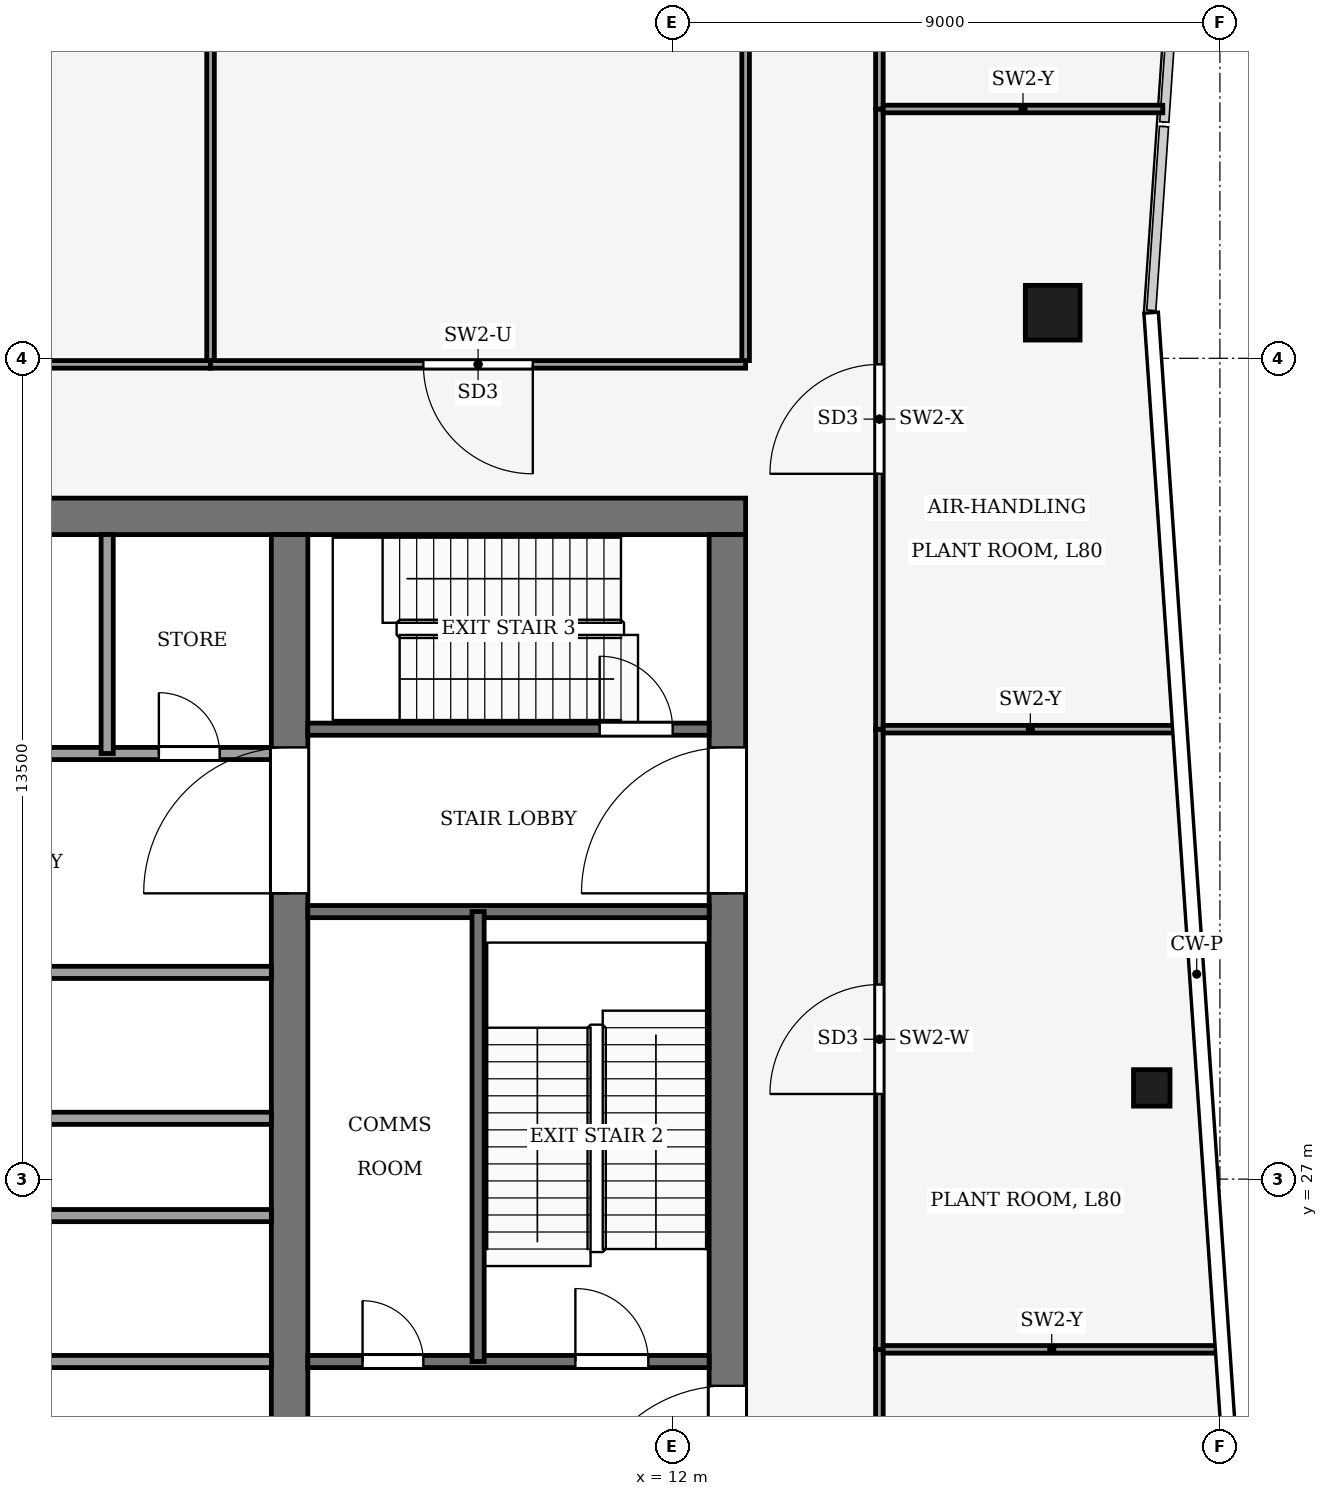
"""IFC4 building model, lengths in metres.
Left out: names, types, materials, properties, quantities, classifications, styles, units other than length and angle.
Written with IfcOpenShell. Run it as: python <this file> out.ifc"""

import sys

from ifc_helpers import new_model, si_unit, direction, frame, frame_2d, origin, origin_2d, place, context, subcontext, project, spatial, rectangle, hollow_rectangle, extrude, element, fill, save


model = new_model("IFC4")
c1 = context("Model", 3, precision=1e-05, world=origin(), true_north=direction((0.0, 1.0)))
c2 = subcontext(c1, "Body", "Model", "MODEL_VIEW")
j1 = project(units=[si_unit("LENGTHUNIT", "METRE"), si_unit("PLANEANGLEUNIT", "RADIAN")], contexts=[c1])
p1 = place(None, origin())
s1 = spatial("IfcSite", under=j1, at=p1, CompositionType="ELEMENT")
p2 = place(p1, origin())
s2 = spatial("IfcBuilding", under=s1, at=p2, CompositionType="ELEMENT")
p3 = place(p2, frame((0.0, 0.0, 354.5)))
s3 = spatial("IfcBuildingStorey", under=s2, at=p3, CompositionType="ELEMENT", Elevation=354.5)
p4 = place(p3, frame((-13.2, 37.9, -0.15), z_axis=(0.0, 0.0, 1.0), x_axis=(1.0, 0.0, 0.0)))
e1 = element("IfcWall", 1, at=p4, inside=s3, PredefinedType="SHEAR", context=c2, shape_type="SweptSolid", body=[
    extrude(rectangle(XDim=26.4, YDim=0.6, at=frame_2d((13.2, 0.0))), origin(), (0.0, 0.0, 1.0), 5.0),
])
p5 = place(p3, frame((12.9, 18.4, -0.15), z_axis=(0.0, 0.0, 1.0), x_axis=(0.0, 1.0, 0.0)))
e2 = element("IfcWall", 2, at=p5, inside=s3, PredefinedType="SHEAR", context=c2, shape_type="SweptSolid", body=[
    extrude(rectangle(XDim=19.2, YDim=0.6, at=frame_2d((9.6, 0.0))), origin(), (0.0, 0.0, 1.0), 5.0),
])
p6 = place(p5, frame((2.8, 0.0, 0.15)))
e3 = element("IfcOpeningElement", 3, at=p6, cuts=e2, PredefinedType="OPENING", context=c2, shape_type="SweptSolid", body=[
    extrude(rectangle(XDim=2.4, YDim=2.4, at=frame_2d((1.2, 1.2))), frame((0.0, 0.31, 0.0), z_axis=(0.0, -1.0, 0.0), x_axis=(1.0, 0.0, 0.0)), (0.0, 0.0, 1.0), 0.62),
])
p7 = place(p5, frame((13.3, 0.0, 0.15)))
e4 = element("IfcOpeningElement", 4, at=p7, cuts=e2, PredefinedType="OPENING", context=c2, shape_type="SweptSolid", body=[
    extrude(rectangle(XDim=2.4, YDim=2.4, at=frame_2d((1.2, 1.2))), frame((0.0, 0.31, 0.0), z_axis=(0.0, -1.0, 0.0), x_axis=(1.0, 0.0, 0.0)), (0.0, 0.0, 1.0), 0.62),
])
p8 = place(p3, frame((5.7, 18.4, -0.15), z_axis=(0.0, 0.0, 1.0), x_axis=(0.0, 1.0, 0.0)))
e5 = element("IfcWall", 5, at=p8, inside=s3, PredefinedType="SHEAR", context=c2, shape_type="SweptSolid", body=[
    extrude(rectangle(XDim=19.2, YDim=0.6, at=frame_2d((9.6, 0.0))), origin(), (0.0, 0.0, 1.0), 5.0),
])
p9 = place(p8, frame((13.3, 0.0, 0.15)))
e6 = element("IfcOpeningElement", 6, at=p9, cuts=e5, PredefinedType="OPENING", context=c2, shape_type="SweptSolid", body=[
    extrude(rectangle(XDim=2.4, YDim=2.4, at=frame_2d((1.2, 1.2))), frame((0.0, 0.31, 0.0), z_axis=(0.0, -1.0, 0.0), x_axis=(1.0, 0.0, 0.0)), (0.0, 0.0, 1.0), 0.62),
])
p10 = place(p3, frame((18.25, 41.25, 0.0), z_axis=(0.0, 0.0, 1.0), x_axis=(1.0, 0.0, 0.0)))
e7 = element("IfcColumn", 7, at=p10, inside=s3, PredefinedType="COLUMN", context=c2, shape_type="SweptSolid", body=[
    extrude(hollow_rectangle(XDim=0.9, YDim=0.9, WallThickness=0.04, at=origin_2d()), origin(), (0.0, 0.0, 1.0), 5.0),
])
p11 = place(p3, frame((19.879, 28.5, 0.0), z_axis=(0.0, 0.0, 1.0), x_axis=(1.0, 0.0, 0.0)))
e8 = element("IfcColumn", 8, at=p11, inside=s3, PredefinedType="COLUMN", context=c2, shape_type="SweptSolid", body=[
    extrude(hollow_rectangle(XDim=0.6, YDim=0.6, WallThickness=0.025, at=origin_2d()), origin(), (0.0, 0.0, 1.0), 5.0),
])
p12 = place(p3, frame((-5.4, 24.0, 0.0), z_axis=(0.0, 0.0, 1.0), x_axis=(1.0, 0.0, 0.0)))
e9 = element("IfcWall", 9, at=p12, inside=s3, PredefinedType="PARTITIONING", context=c2, shape_type="SweptSolid", body=[
    extrude(rectangle(XDim=10.8, YDim=0.2, at=frame_2d((5.4, 0.0))), origin(), (0.0, 0.0, 1.0), 4.85),
])
p13 = place(p12, frame((4.9, 0.0, 0.0)))
e10 = element("IfcOpeningElement", 10, at=p13, cuts=e9, PredefinedType="OPENING", context=c2, shape_type="SweptSolid", body=[
    extrude(rectangle(XDim=1.0, YDim=2.1, at=frame_2d((0.5, 1.05))), frame((0.0, 0.11, 0.0), z_axis=(0.0, -1.0, 0.0), x_axis=(1.0, 0.0, 0.0)), (0.0, 0.0, 1.0), 0.22),
])
p14 = place(p3, frame((6.0, 24.0, 0.0), z_axis=(0.0, 0.0, 1.0), x_axis=(1.0, 0.0, 0.0)))
e11 = element("IfcWall", 11, at=p14, inside=s3, PredefinedType="PARTITIONING", context=c2, shape_type="SweptSolid", body=[
    extrude(rectangle(XDim=6.6, YDim=0.2, at=frame_2d((3.3, 0.0))), origin(), (0.0, 0.0, 1.0), 4.85),
])
p15 = place(p14, frame((0.9, 0.0, 0.0)))
e12 = element("IfcOpeningElement", 12, at=p15, cuts=e11, PredefinedType="OPENING", context=c2, shape_type="SweptSolid", body=[
    extrude(rectangle(XDim=1.0, YDim=2.1, at=frame_2d((0.5, 1.05))), frame((0.0, 0.11, 0.0), z_axis=(0.0, -1.0, 0.0), x_axis=(1.0, 0.0, 0.0)), (0.0, 0.0, 1.0), 0.22),
])
p16 = place(p14, frame((4.4, 0.0, 0.0)))
e13 = element("IfcOpeningElement", 13, at=p16, cuts=e11, PredefinedType="OPENING", context=c2, shape_type="SweptSolid", body=[
    extrude(rectangle(XDim=1.2, YDim=2.2, at=frame_2d((0.6, 1.1))), frame((0.0, 0.11, 0.0), z_axis=(0.0, -1.0, 0.0), x_axis=(1.0, 0.0, 0.0)), (0.0, 0.0, 1.0), 0.22),
])
for number, where, z_axis, x_axis in (
    (14, (-5.4, 26.4, 0.0), (0.0, 0.0, 1.0), (1.0, 0.0, 0.0)),
    (15, (-5.4, 28.0, 0.0), (0.0, 0.0, 1.0), (1.0, 0.0, 0.0)),
):
    element("IfcWall", number, at=place(p3, frame(where, z_axis=z_axis, x_axis=x_axis)), inside=s3, PredefinedType="PARTITIONING", context=c2, shape_type="SweptSolid", body=[
        extrude(rectangle(XDim=10.8, YDim=0.2, at=frame_2d((5.4, 0.0))), origin(), (0.0, 0.0, 1.0), 4.85),
    ])
p17 = place(p3, frame((-5.4, 30.4, 0.0), z_axis=(0.0, 0.0, 1.0), x_axis=(1.0, 0.0, 0.0)))
e16 = element("IfcWall", 16, at=p17, inside=s3, PredefinedType="PARTITIONING", context=c2, shape_type="SweptSolid", body=[
    extrude(rectangle(XDim=10.8, YDim=0.2, at=frame_2d((5.4, 0.0))), origin(), (0.0, 0.0, 1.0), 4.85),
])
p18 = place(p17, frame((4.9, 0.0, 0.0)))
e17 = element("IfcOpeningElement", 17, at=p18, cuts=e16, PredefinedType="OPENING", context=c2, shape_type="SweptSolid", body=[
    extrude(rectangle(XDim=1.0, YDim=2.1, at=frame_2d((0.5, 1.05))), frame((0.0, 0.11, 0.0), z_axis=(0.0, -1.0, 0.0), x_axis=(1.0, 0.0, 0.0)), (0.0, 0.0, 1.0), 0.22),
])
p19 = place(p3, frame((6.0, 31.4, 0.0), z_axis=(0.0, 0.0, 1.0), x_axis=(1.0, 0.0, 0.0)))
e18 = element("IfcWall", 18, at=p19, inside=s3, PredefinedType="PARTITIONING", context=c2, shape_type="SweptSolid", body=[
    extrude(rectangle(XDim=6.6, YDim=0.2, at=frame_2d((3.3, 0.0))), origin(), (0.0, 0.0, 1.0), 4.85),
])
p20 = place(p3, frame((-5.4, 34.0, 0.0), z_axis=(0.0, 0.0, 1.0), x_axis=(1.0, 0.0, 0.0)))
e19 = element("IfcWall", 19, at=p20, inside=s3, PredefinedType="PARTITIONING", context=c2, shape_type="SweptSolid", body=[
    extrude(rectangle(XDim=10.8, YDim=0.2, at=frame_2d((5.4, 0.0))), origin(), (0.0, 0.0, 1.0), 4.85),
])
p21 = place(p20, frame((3.55, 0.0, 0.0)))
e20 = element("IfcOpeningElement", 20, at=p21, cuts=e19, PredefinedType="OPENING", context=c2, shape_type="SweptSolid", body=[
    extrude(rectangle(XDim=1.0, YDim=2.1, at=frame_2d((0.5, 1.05))), frame((0.0, 0.11, 0.0), z_axis=(0.0, -1.0, 0.0), x_axis=(1.0, 0.0, 0.0)), (0.0, 0.0, 1.0), 0.22),
])
p22 = place(p20, frame((8.95, 0.0, 0.0)))
e21 = element("IfcOpeningElement", 21, at=p22, cuts=e19, PredefinedType="OPENING", context=c2, shape_type="SweptSolid", body=[
    extrude(rectangle(XDim=1.0, YDim=2.1, at=frame_2d((0.5, 1.05))), frame((0.0, 0.11, 0.0), z_axis=(0.0, -1.0, 0.0), x_axis=(1.0, 0.0, 0.0)), (0.0, 0.0, 1.0), 0.22),
])
p23 = place(p3, frame((6.0, 34.4, 0.0), z_axis=(0.0, 0.0, 1.0), x_axis=(1.0, 0.0, 0.0)))
e22 = element("IfcWall", 22, at=p23, inside=s3, PredefinedType="PARTITIONING", context=c2, shape_type="SweptSolid", body=[
    extrude(rectangle(XDim=6.6, YDim=0.2, at=frame_2d((3.3, 0.0))), origin(), (0.0, 0.0, 1.0), 4.85),
])
p24 = place(p23, frame((4.8, 0.0, 0.0)))
e23 = element("IfcOpeningElement", 23, at=p24, cuts=e22, PredefinedType="OPENING", context=c2, shape_type="SweptSolid", body=[
    extrude(rectangle(XDim=1.2, YDim=2.2, at=frame_2d((0.6, 1.1))), frame((0.0, 0.11, 0.0), z_axis=(0.0, -1.0, 0.0), x_axis=(1.0, 0.0, 0.0)), (0.0, 0.0, 1.0), 0.22),
])
p25 = place(p3, frame((2.7, 34.0, 0.0), z_axis=(0.0, 0.0, 1.0), x_axis=(0.0, 1.0, 0.0)))
e24 = element("IfcWall", 24, at=p25, inside=s3, PredefinedType="PARTITIONING", context=c2, shape_type="SweptSolid", body=[
    extrude(rectangle(XDim=3.6, YDim=0.2, at=frame_2d((1.8, 0.0))), origin(), (0.0, 0.0, 1.0), 4.85),
])
p26 = place(p3, frame((8.8, 24.0, 0.0), z_axis=(0.0, 0.0, 1.0), x_axis=(0.0, 1.0, 0.0)))
e25 = element("IfcWall", 25, at=p26, inside=s3, PredefinedType="PARTITIONING", context=c2, shape_type="SweptSolid", body=[
    extrude(rectangle(XDim=7.4, YDim=0.2, at=frame_2d((3.7, 0.0))), origin(), (0.0, 0.0, 1.0), 4.85),
])
p27 = place(p3, frame((4.4, 40.4, 0.0), z_axis=(0.0, 0.0, 1.0), x_axis=(-1.0, 0.0, 0.0)))
e26 = element("IfcWall", 26, at=p27, inside=s3, PredefinedType="PARTITIONING", context=c2, shape_type="SweptSolid", body=[
    extrude(rectangle(XDim=8.8, YDim=0.125, at=frame_2d((4.4, 0.0))), origin(), (0.0, 0.0, 1.0), 4.37),
])
p28 = place(p27, frame((3.5, 0.0, 0.0)))
e27 = element("IfcOpeningElement", 27, at=p28, cuts=e26, PredefinedType="OPENING", context=c2, shape_type="SweptSolid", body=[
    extrude(rectangle(XDim=1.8, YDim=2.4, at=frame_2d((0.9, 1.2))), frame((0.0, 0.073, 0.0), z_axis=(0.0, -1.0, 0.0), x_axis=(1.0, 0.0, 0.0)), (0.0, 0.0, 1.0), 0.145),
])
p29 = place(p3, frame((13.2, 40.4, 0.0), z_axis=(0.0, 0.0, 1.0), x_axis=(-1.0, 0.0, 0.0)))
e28 = element("IfcWall", 28, at=p29, inside=s3, PredefinedType="PARTITIONING", context=c2, shape_type="SweptSolid", body=[
    extrude(rectangle(XDim=8.8, YDim=0.125, at=frame_2d((4.4, 0.0))), origin(), (0.0, 0.0, 1.0), 4.37),
])
p30 = place(p29, frame((3.5, 0.0, 0.0)))
e29 = element("IfcOpeningElement", 29, at=p30, cuts=e28, PredefinedType="OPENING", context=c2, shape_type="SweptSolid", body=[
    extrude(rectangle(XDim=1.8, YDim=2.4, at=frame_2d((0.9, 1.2))), frame((0.0, 0.073, 0.0), z_axis=(0.0, -1.0, 0.0), x_axis=(1.0, 0.0, 0.0)), (0.0, 0.0, 1.0), 0.145),
])
p31 = place(p3, frame((13.2, 40.462, 0.0), z_axis=(0.0, 0.0, 1.0), x_axis=(0.0, 1.0, 0.0)))
e30 = element("IfcWall", 30, at=p31, inside=s3, PredefinedType="PARTITIONING", context=c2, shape_type="SweptSolid", body=[
    extrude(rectangle(XDim=14.338, YDim=0.125, at=frame_2d((7.169, 0.0))), origin(), (0.0, 0.0, 1.0), 4.33),
])
p32 = place(p3, frame((15.4, 13.45, 0.0), z_axis=(0.0, 0.0, 1.0), x_axis=(0.0, 1.0, 0.0)))
e31 = element("IfcWall", 31, at=p32, inside=s3, PredefinedType="PARTITIONING", context=c2, shape_type="SweptSolid", body=[
    extrude(rectangle(XDim=10.75, YDim=0.125, at=frame_2d((5.375, 0.0))), origin(), (0.0, 0.0, 1.0), 3.812),
])
p33 = place(p32, frame((5.145, 0.0, 0.0)))
e32 = element("IfcOpeningElement", 32, at=p33, cuts=e31, PredefinedType="OPENING", context=c2, shape_type="SweptSolid", body=[
    extrude(rectangle(XDim=1.0, YDim=2.1, at=frame_2d((0.5, 1.05))), frame((0.0, 0.073, 0.0), z_axis=(0.0, -1.0, 0.0), x_axis=(1.0, 0.0, 0.0)), (0.0, 0.0, 1.0), 0.145),
])
p34 = place(p3, frame((15.4, 24.2, 0.0), z_axis=(0.0, 0.0, 1.0), x_axis=(0.0, 1.0, 0.0)))
e33 = element("IfcWall", 33, at=p34, inside=s3, PredefinedType="PARTITIONING", context=c2, shape_type="SweptSolid", body=[
    extrude(rectangle(XDim=10.2, YDim=0.125, at=frame_2d((5.1, 0.0))), origin(), (0.0, 0.0, 1.0), 4.52),
])
p35 = place(p34, frame((4.2, 0.0, 0.0)))
e34 = element("IfcOpeningElement", 34, at=p35, cuts=e33, PredefinedType="OPENING", context=c2, shape_type="SweptSolid", body=[
    extrude(rectangle(XDim=1.8, YDim=2.4, at=frame_2d((0.9, 1.2))), frame((0.0, 0.073, 0.0), z_axis=(0.0, -1.0, 0.0), x_axis=(1.0, 0.0, 0.0)), (0.0, 0.0, 1.0), 0.145),
])
p36 = place(p3, frame((15.4, 34.4, 0.0), z_axis=(0.0, 0.0, 1.0), x_axis=(0.0, 1.0, 0.0)))
e35 = element("IfcWall", 35, at=p36, inside=s3, PredefinedType="PARTITIONING", context=c2, shape_type="SweptSolid", body=[
    extrude(rectangle(XDim=10.2, YDim=0.125, at=frame_2d((5.1, 0.0))), origin(), (0.0, 0.0, 1.0), 4.12),
])
p37 = place(p36, frame((4.2, 0.0, 0.0)))
e36 = element("IfcOpeningElement", 36, at=p37, cuts=e35, PredefinedType="OPENING", context=c2, shape_type="SweptSolid", body=[
    extrude(rectangle(XDim=1.8, YDim=2.4, at=frame_2d((0.9, 1.2))), frame((0.0, 0.073, 0.0), z_axis=(0.0, -1.0, 0.0), x_axis=(1.0, 0.0, 0.0)), (0.0, 0.0, 1.0), 0.145),
])
p38 = place(p3, frame((15.4, 54.738, 0.0), z_axis=(0.0, 0.0, 1.0), x_axis=(0.0, -1.0, 0.0)))
e37 = element("IfcWall", 37, at=p38, inside=s3, PredefinedType="PARTITIONING", context=c2, shape_type="SweptSolid", body=[
    extrude(rectangle(XDim=10.137, YDim=0.125, at=frame_2d((5.069, 0.0))), origin(), (0.0, 0.0, 1.0), 4.33),
])
p39 = place(p3, frame((4.4, 54.738, 0.0), z_axis=(0.0, 0.0, 1.0), x_axis=(0.0, -1.0, 0.0)))
e38 = element("IfcWall", 38, at=p39, inside=s3, PredefinedType="PARTITIONING", context=c2, shape_type="SweptSolid", body=[
    extrude(rectangle(XDim=14.275, YDim=0.125, at=frame_2d((7.138, 0.0))), origin(), (0.0, 0.0, 1.0), 4.22),
])
p40 = place(p3, frame((15.462, 24.2, 0.0), z_axis=(0.0, 0.0, 1.0), x_axis=(1.0, 0.0, 0.0)))
e39 = element("IfcWall", 39, at=p40, inside=s3, PredefinedType="PARTITIONING", context=c2, shape_type="SweptSolid", body=[
    extrude(rectangle(XDim=5.543, YDim=0.125, at=frame_2d((2.772, 0.0))), origin(), (0.0, 0.0, 1.0), 4.02),
])
p41 = place(p3, frame((15.462, 34.4, 0.0), z_axis=(0.0, 0.0, 1.0), x_axis=(1.0, 0.0, 0.0)))
e40 = element("IfcWall", 40, at=p41, inside=s3, PredefinedType="PARTITIONING", context=c2, shape_type="SweptSolid", body=[
    extrude(rectangle(XDim=4.84, YDim=0.125, at=frame_2d((2.42, 0.0))), origin(), (0.0, 0.0, 1.0), 4.02),
])
p42 = place(p3, frame((15.462, 44.6, 0.0), z_axis=(0.0, 0.0, 1.0), x_axis=(1.0, 0.0, 0.0)))
e41 = element("IfcWall", 41, at=p42, inside=s3, PredefinedType="PARTITIONING", context=c2, shape_type="SweptSolid", body=[
    extrude(rectangle(XDim=4.599, YDim=0.125, at=frame_2d((2.299, 0.0))), origin(), (0.0, 0.0, 1.0), 4.02),
])
p43 = place(p15, origin())
e42 = element("IfcDoor", 42, at=p43, inside=s3, OperationType="SINGLE_SWING_RIGHT", PredefinedType="DOOR", context=c2, shape_type="SweptSolid", body=[
    extrude(rectangle(XDim=1.0, YDim=2.1, at=frame_2d((0.5, 1.05))), frame((0.0, 0.025, 0.0), z_axis=(0.0, -1.0, 0.0), x_axis=(1.0, 0.0, 0.0)), (0.0, 0.0, 1.0), 0.05),
])
fill(e12, e42)
p44 = place(p22, origin())
e43 = element("IfcDoor", 43, at=p44, inside=s3, OperationType="SINGLE_SWING_LEFT", PredefinedType="DOOR", context=c2, shape_type="SweptSolid", body=[
    extrude(rectangle(XDim=1.0, YDim=2.1, at=frame_2d((0.5, 1.05))), frame((0.0, 0.025, 0.0), z_axis=(0.0, -1.0, 0.0), x_axis=(1.0, 0.0, 0.0)), (0.0, 0.0, 1.0), 0.05),
])
fill(e21, e43)
p45 = place(p16, origin())
e44 = element("IfcDoor", 44, at=p45, inside=s3, OperationType="SINGLE_SWING_RIGHT", PredefinedType="DOOR", context=c2, shape_type="SweptSolid", body=[
    extrude(rectangle(XDim=1.2, YDim=2.2, at=frame_2d((0.6, 1.1))), frame((0.0, 0.025, 0.0), z_axis=(0.0, -1.0, 0.0), x_axis=(1.0, 0.0, 0.0)), (0.0, 0.0, 1.0), 0.05),
])
fill(e13, e44)
p46 = place(p24, origin())
e45 = element("IfcDoor", 45, at=p46, inside=s3, OperationType="SINGLE_SWING_LEFT", PredefinedType="DOOR", context=c2, shape_type="SweptSolid", body=[
    extrude(rectangle(XDim=1.2, YDim=2.2, at=frame_2d((0.6, 1.1))), frame((0.0, 0.025, 0.0), z_axis=(0.0, -1.0, 0.0), x_axis=(1.0, 0.0, 0.0)), (0.0, 0.0, 1.0), 0.05),
])
fill(e23, e45)
p47 = place(p9, origin())
e46 = element("IfcDoor", 46, at=p47, inside=s3, OperationType="DOUBLE_DOOR_SINGLE_SWING", PredefinedType="DOOR", context=c2, shape_type="SweptSolid", body=[
    extrude(rectangle(XDim=2.4, YDim=2.4, at=frame_2d((1.2, 1.2))), frame((0.0, 0.025, 0.0), z_axis=(0.0, -1.0, 0.0), x_axis=(1.0, 0.0, 0.0)), (0.0, 0.0, 1.0), 0.05),
])
fill(e6, e46)
p48 = place(p6, origin())
e47 = element("IfcDoor", 47, at=p48, inside=s3, OperationType="DOUBLE_DOOR_SINGLE_SWING", PredefinedType="DOOR", context=c2, shape_type="SweptSolid", body=[
    extrude(rectangle(XDim=2.4, YDim=2.4, at=frame_2d((1.2, 1.2))), frame((0.0, 0.025, 0.0), z_axis=(0.0, -1.0, 0.0), x_axis=(1.0, 0.0, 0.0)), (0.0, 0.0, 1.0), 0.05),
])
fill(e3, e47)
p49 = place(p7, origin())
e48 = element("IfcDoor", 48, at=p49, inside=s3, OperationType="DOUBLE_DOOR_SINGLE_SWING", PredefinedType="DOOR", context=c2, shape_type="SweptSolid", body=[
    extrude(rectangle(XDim=2.4, YDim=2.4, at=frame_2d((1.2, 1.2))), frame((0.0, 0.025, 0.0), z_axis=(0.0, -1.0, 0.0), x_axis=(1.0, 0.0, 0.0)), (0.0, 0.0, 1.0), 0.05),
])
fill(e4, e48)
p50 = place(p30, origin())
e49 = element("IfcDoor", 49, at=p50, inside=s3, OperationType="DOUBLE_DOOR_SINGLE_SWING", PredefinedType="DOOR", context=c2, shape_type="SweptSolid", body=[
    extrude(rectangle(XDim=1.8, YDim=2.4, at=frame_2d((0.9, 1.2))), frame((0.0, 0.025, 0.0), z_axis=(0.0, -1.0, 0.0), x_axis=(1.0, 0.0, 0.0)), (0.0, 0.0, 1.0), 0.05),
])
fill(e29, e49)
p51 = place(p35, origin())
e50 = element("IfcDoor", 50, at=p51, inside=s3, OperationType="DOUBLE_DOOR_SINGLE_SWING", PredefinedType="DOOR", context=c2, shape_type="SweptSolid", body=[
    extrude(rectangle(XDim=1.8, YDim=2.4, at=frame_2d((0.9, 1.2))), frame((0.0, 0.025, 0.0), z_axis=(0.0, -1.0, 0.0), x_axis=(1.0, 0.0, 0.0)), (0.0, 0.0, 1.0), 0.05),
])
fill(e34, e50)
p52 = place(p37, origin())
e51 = element("IfcDoor", 51, at=p52, inside=s3, OperationType="DOUBLE_DOOR_SINGLE_SWING", PredefinedType="DOOR", context=c2, shape_type="SweptSolid", body=[
    extrude(rectangle(XDim=1.8, YDim=2.4, at=frame_2d((0.9, 1.2))), frame((0.0, 0.025, 0.0), z_axis=(0.0, -1.0, 0.0), x_axis=(1.0, 0.0, 0.0)), (0.0, 0.0, 1.0), 0.05),
])
fill(e36, e51)
save(model, sys.argv[1])
